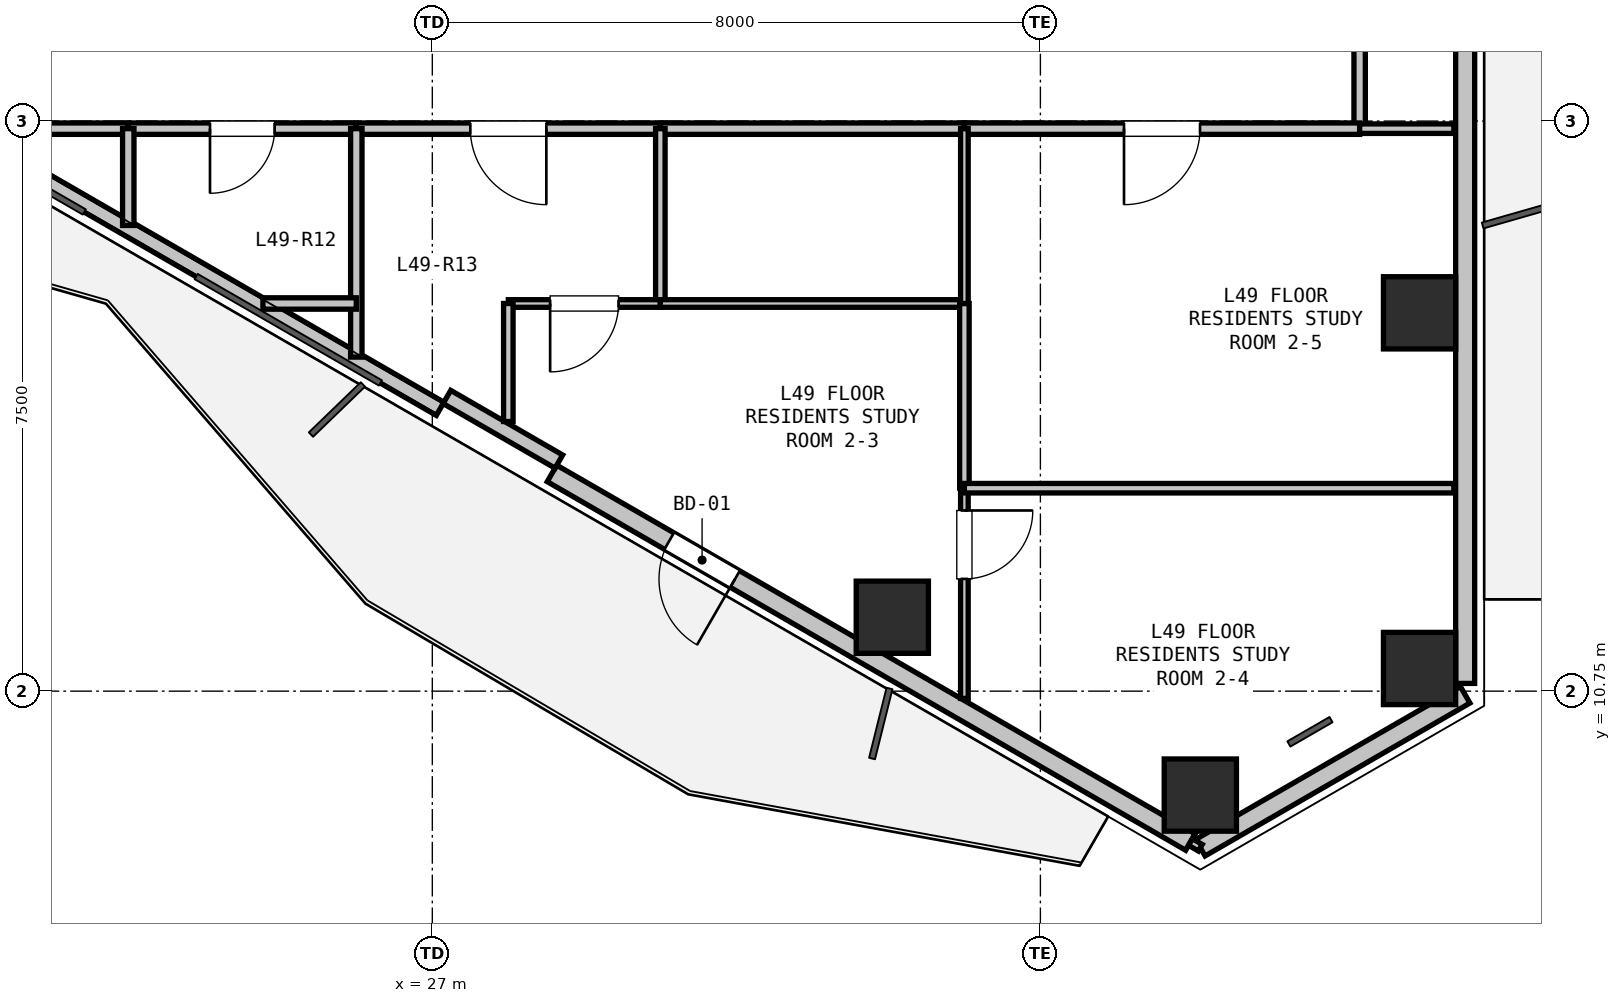
"""IFC4 building model, lengths in metres.
Left out: names, types, materials, properties, quantities, classifications, styles, units other than length and angle.
Written with IfcOpenShell. Run it as: python <this file> out.ifc"""

import sys

from ifc_helpers import new_model, si_unit, direction, frame, frame_2d, origin, origin_2d, place, context, subcontext, project, spatial, rectangle, hollow_rectangle, extrude, element, fill, save


model = new_model("IFC4")
c1 = context("Model", 3, precision=1e-05, world=origin(), true_north=direction((0.0, 1.0)))
c2 = subcontext(c1, "Body", "Model", "MODEL_VIEW")
j1 = project(units=[si_unit("LENGTHUNIT", "METRE"), si_unit("PLANEANGLEUNIT", "RADIAN")], contexts=[c1])
p1 = place(None, origin())
s1 = spatial("IfcSite", under=j1, at=p1, CompositionType="ELEMENT")
p2 = place(p1, origin())
s2 = spatial("IfcBuilding", under=s1, at=p2, CompositionType="ELEMENT")
p3 = place(p2, frame((0.0, 0.0, 178.8)))
s3 = spatial("IfcBuildingStorey", under=s2, at=p3, CompositionType="ELEMENT", Elevation=178.8)
for number, where, z_axis, x_axis in (
    (1, (39.988, 15.727, 0.0), (0.0, 0.0, 1.0), (1.0, 0.0, 0.0)),
    (2, (39.988, 11.048, 0.0), (0.0, 0.0, 1.0), (1.0, 0.0, 0.0)),
    (3, (37.104, 9.383, 0.0), (0.0, 0.0, 1.0), (1.0, 0.0, 0.0)),
    (4, (33.052, 11.722, 0.0), (0.0, 0.0, 1.0), (1.0, 0.0, 0.0)),
):
    element("IfcColumn", number, at=place(p3, frame(where, z_axis=z_axis, x_axis=x_axis)), inside=s3, PredefinedType="COLUMN", context=c2, shape_type="SweptSolid", body=[
        extrude(hollow_rectangle(XDim=0.95, YDim=0.95, WallThickness=0.028, at=origin_2d()), origin(), (0.0, 0.0, 1.0), 3.3),
    ])
p4 = place(p3, frame((40.588, 10.702, 0.0), z_axis=(0.0, 0.0, 1.0), x_axis=(-0.866023907196, -0.500002592159, 0.0)))
e5 = element("IfcWall", 5, at=p4, inside=s3, PredefinedType="SOLIDWALL", context=c2, shape_type="SweptSolid", body=[
    extrude(rectangle(XDim=4.023, YDim=0.25, at=frame_2d((2.012, 0.0))), origin(), (0.0, 0.0, 1.0), 2.69),
])
p5 = place(p3, frame((40.588, 20.551, 0.0), z_axis=(0.0, 0.0, 1.0), x_axis=(0.0, -1.0, 0.0)))
e6 = element("IfcWall", 6, at=p5, inside=s3, PredefinedType="SOLIDWALL", context=c2, shape_type="SweptSolid", body=[
    extrude(rectangle(XDim=9.699, YDim=0.25, at=frame_2d((4.85, 0.0))), origin(), (0.0, 0.0, 1.0), 2.69),
])
p6 = place(p3, frame((36.974, 8.765, 0.0), z_axis=(0.0, 0.0, 1.0), x_axis=(-0.866016233231, 0.500015883528, 0.0)))
e7 = element("IfcWall", 7, at=p6, inside=s3, PredefinedType="SOLIDWALL", context=c2, shape_type="SweptSolid", body=[
    extrude(rectangle(XDim=9.699, YDim=0.25, at=frame_2d((4.85, 0.0))), origin(), (0.0, 0.0, 1.0), 2.69),
])
p7 = place(p6, frame((6.919, 0.0, 0.0)))
e8 = element("IfcOpeningElement", 8, at=p7, cuts=e7, PredefinedType="OPENING", context=c2, shape_type="SweptSolid", body=[
    extrude(rectangle(XDim=1.0, YDim=2.1, at=frame_2d((0.5, 1.05))), frame((0.0, 0.135, 0.0), z_axis=(0.0, -1.0, 0.0), x_axis=(1.0, 0.0, 0.0)), (0.0, 0.0, 1.0), 0.27),
])
p8 = place(p3, frame((27.102, 14.464, 0.0), z_axis=(0.0, 0.0, 1.0), x_axis=(-0.866020680503, 0.500008180874, 0.0)))
e9 = element("IfcWall", 9, at=p8, inside=s3, PredefinedType="PARAPET", context=c2, shape_type="SweptSolid", body=[
    extrude(rectangle(XDim=8.999, YDim=0.2, at=frame_2d((4.5, 0.0))), origin(), (0.0, 0.0, 1.0), 0.2),
])
p9 = place(p3, frame((28.665, 13.77, 0.0), z_axis=(0.0, 0.0, 1.0), x_axis=(-0.866025371046, 0.500000056704, 0.0)))
e10 = element("IfcWall", 10, at=p9, inside=s3, PredefinedType="PARAPET", context=c2, shape_type="SweptSolid", body=[
    extrude(rectangle(XDim=1.7, YDim=0.2, at=frame_2d((0.85, 0.0))), origin(), (0.0, 0.0, 1.0), 2.69),
])
p10 = place(p3, frame((39.2, 19.9, 0.0), z_axis=(0.0, 0.0, 1.0), x_axis=(0.0, -1.0, 0.0)))
e11 = element("IfcWall", 11, at=p10, inside=s3, PredefinedType="PARTITIONING", context=c2, shape_type="SweptSolid", body=[
    extrude(rectangle(XDim=1.75, YDim=0.15, at=frame_2d((0.875, 0.0))), origin(), (0.0, 0.0, 1.0), 3.07),
])
p11 = place(p3, frame((39.2, 18.15, 0.0), z_axis=(0.0, 0.0, 1.0), x_axis=(-1.0, 0.0, 0.0)))
e12 = element("IfcWall", 12, at=p11, inside=s3, PredefinedType="PARTITIONING", context=c2, shape_type="SweptSolid", body=[
    extrude(rectangle(XDim=5.2, YDim=0.15, at=frame_2d((2.6, 0.0))), origin(), (0.0, 0.0, 1.0), 2.518),
])
p12 = place(p11, frame((2.1, 0.0, 0.0)))
e13 = element("IfcOpeningElement", 13, at=p12, cuts=e12, PredefinedType="OPENING", context=c2, shape_type="SweptSolid", body=[
    extrude(rectangle(XDim=1.0, YDim=2.15, at=frame_2d((0.5, 1.075))), frame((0.0, 0.085, 0.0), z_axis=(0.0, -1.0, 0.0), x_axis=(1.0, 0.0, 0.0)), (0.0, 0.0, 1.0), 0.17),
])
p13 = place(p3, frame((34.0, 18.15, 0.0), z_axis=(0.0, 0.0, 1.0), x_axis=(-1.0, 0.0, 0.0)))
e14 = element("IfcWall", 14, at=p13, inside=s3, PredefinedType="PARTITIONING", context=c2, shape_type="SweptSolid", body=[
    extrude(rectangle(XDim=4.0, YDim=0.15, at=frame_2d((2.0, 0.0))), origin(), (0.0, 0.0, 1.0), 3.07),
])
p14 = place(p3, frame((30.0, 18.15, 0.0), z_axis=(0.0, 0.0, 1.0), x_axis=(-1.0, 0.0, 0.0)))
e15 = element("IfcWall", 15, at=p14, inside=s3, PredefinedType="PARTITIONING", context=c2, shape_type="SweptSolid", body=[
    extrude(rectangle(XDim=4.0, YDim=0.15, at=frame_2d((2.0, 0.0))), origin(), (0.0, 0.0, 1.0), 3.07),
])
p15 = place(p14, frame((1.5, 0.0, 0.0)))
e16 = element("IfcOpeningElement", 16, at=p15, cuts=e15, PredefinedType="OPENING", context=c2, shape_type="SweptSolid", body=[
    extrude(rectangle(XDim=1.0, YDim=2.15, at=frame_2d((0.5, 1.075))), frame((0.0, 0.085, 0.0), z_axis=(0.0, -1.0, 0.0), x_axis=(1.0, 0.0, 0.0)), (0.0, 0.0, 1.0), 0.17),
])
p16 = place(p3, frame((26.0, 18.15, 0.0), z_axis=(0.0, 0.0, 1.0), x_axis=(-1.0, 0.0, 0.0)))
e17 = element("IfcWall", 17, at=p16, inside=s3, PredefinedType="PARTITIONING", context=c2, shape_type="SweptSolid", body=[
    extrude(rectangle(XDim=3.0, YDim=0.15, at=frame_2d((1.5, 0.0))), origin(), (0.0, 0.0, 1.0), 2.518),
])
p17 = place(p16, frame((1.075, 0.0, 0.0)))
e18 = element("IfcOpeningElement", 18, at=p17, cuts=e17, PredefinedType="OPENING", context=c2, shape_type="SweptSolid", body=[
    extrude(rectangle(XDim=0.85, YDim=2.1, at=frame_2d((0.425, 1.05))), frame((0.0, 0.085, 0.0), z_axis=(0.0, -1.0, 0.0), x_axis=(1.0, 0.0, 0.0)), (0.0, 0.0, 1.0), 0.17),
])
p18 = place(p3, frame((23.0, 18.15, 0.0), z_axis=(0.0, 0.0, 1.0), x_axis=(-1.0, 0.0, 0.0)))
e19 = element("IfcWall", 19, at=p18, inside=s3, PredefinedType="PARTITIONING", context=c2, shape_type="SweptSolid", body=[
    extrude(rectangle(XDim=2.212, YDim=0.15, at=frame_2d((1.106, 0.0))), origin(), (0.0, 0.0, 1.0), 2.365),
])
p19 = place(p3, frame((26.0, 18.15, 0.0), z_axis=(0.0, 0.0, 1.0), x_axis=(0.0, -1.0, 0.0)))
e20 = element("IfcWall", 20, at=p19, inside=s3, PredefinedType="PARTITIONING", context=c2, shape_type="SweptSolid", body=[
    extrude(rectangle(XDim=3.005, YDim=0.15, at=frame_2d((1.502, 0.0))), origin(), (0.0, 0.0, 1.0), 2.365),
])
p20 = place(p3, frame((26.0, 15.85, 0.0), z_axis=(0.0, 0.0, 1.0), x_axis=(-1.0, 0.0, 0.0)))
e21 = element("IfcWall", 21, at=p20, inside=s3, PredefinedType="PARTITIONING", context=c2, shape_type="SweptSolid", body=[
    extrude(rectangle(XDim=1.229, YDim=0.15, at=frame_2d((0.614, 0.0))), origin(), (0.0, 0.0, 1.0), 2.365),
])
p21 = place(p3, frame((23.0, 16.877, 0.0), z_axis=(0.0, 0.0, 1.0), x_axis=(0.0, 1.0, 0.0)))
e22 = element("IfcWall", 22, at=p21, inside=s3, PredefinedType="PARTITIONING", context=c2, shape_type="SweptSolid", body=[
    extrude(rectangle(XDim=1.273, YDim=0.15, at=frame_2d((0.636, 0.0))), origin(), (0.0, 0.0, 1.0), 2.365),
])
p22 = place(p3, frame((30.0, 18.15, 0.0), z_axis=(0.0, 0.0, 1.0), x_axis=(0.0, -1.0, 0.0)))
e23 = element("IfcWall", 23, at=p22, inside=s3, PredefinedType="PARTITIONING", context=c2, shape_type="SweptSolid", body=[
    extrude(rectangle(XDim=2.3, YDim=0.125, at=frame_2d((1.15, 0.0))), origin(), (0.0, 0.0, 1.0), 3.07),
])
p23 = place(p3, frame((30.0, 15.85, 0.0), z_axis=(0.0, 0.0, 1.0), x_axis=(-1.0, 0.0, 0.0)))
e24 = element("IfcWall", 24, at=p23, inside=s3, PredefinedType="PARTITIONING", context=c2, shape_type="SweptSolid", body=[
    extrude(rectangle(XDim=2.0, YDim=0.1, at=frame_2d((1.0, 0.0))), origin(), (0.0, 0.0, 1.0), 3.07),
])
p24 = place(p23, frame((0.55, 0.0, 0.0)))
e25 = element("IfcOpeningElement", 25, at=p24, cuts=e24, PredefinedType="OPENING", context=c2, shape_type="SweptSolid", body=[
    extrude(rectangle(XDim=0.9, YDim=2.1, at=frame_2d((0.45, 1.05))), frame((0.0, 0.06, 0.0), z_axis=(0.0, -1.0, 0.0), x_axis=(1.0, 0.0, 0.0)), (0.0, 0.0, 1.0), 0.12),
])
p25 = place(p3, frame((28.0, 15.85, 0.0), z_axis=(0.0, 0.0, 1.0), x_axis=(0.0, -1.0, 0.0)))
e26 = element("IfcWall", 26, at=p25, inside=s3, PredefinedType="PARTITIONING", context=c2, shape_type="SweptSolid", body=[
    extrude(rectangle(XDim=1.553, YDim=0.125, at=frame_2d((0.776, 0.0))), origin(), (0.0, 0.0, 1.0), 2.365),
])
p26 = place(p3, frame((30.0, 15.85, 0.0), z_axis=(0.0, 0.0, 1.0), x_axis=(1.0, 0.0, 0.0)))
e27 = element("IfcWall", 27, at=p26, inside=s3, PredefinedType="PARTITIONING", context=c2, shape_type="SweptSolid", body=[
    extrude(rectangle(XDim=4.0, YDim=0.1, at=frame_2d((2.0, 0.0))), origin(), (0.0, 0.0, 1.0), 3.07),
])
p27 = place(p3, frame((34.0, 15.85, 0.0), z_axis=(0.0, 0.0, 1.0), x_axis=(0.0, -1.0, 0.0)))
e28 = element("IfcWall", 28, at=p27, inside=s3, PredefinedType="PARTITIONING", context=c2, shape_type="SweptSolid", body=[
    extrude(rectangle(XDim=2.43, YDim=0.125, at=frame_2d((1.215, 0.0))), origin(), (0.0, 0.0, 1.0), 3.07),
])
p28 = place(p3, frame((34.0, 13.42, 0.0), z_axis=(0.0, 0.0, 1.0), x_axis=(0.0, -1.0, 0.0)))
e29 = element("IfcWall", 29, at=p28, inside=s3, PredefinedType="PARTITIONING", context=c2, shape_type="SweptSolid", body=[
    extrude(rectangle(XDim=2.766, YDim=0.1, at=frame_2d((1.383, 0.0))), origin(), (0.0, 0.0, 1.0), 2.734),
])
p29 = place(p28, frame((0.293, 0.0, 0.0)))
e30 = element("IfcOpeningElement", 30, at=p29, cuts=e29, PredefinedType="OPENING", context=c2, shape_type="SweptSolid", body=[
    extrude(rectangle(XDim=0.9, YDim=2.1, at=frame_2d((0.45, 1.05))), frame((0.0, 0.06, 0.0), z_axis=(0.0, -1.0, 0.0), x_axis=(1.0, 0.0, 0.0)), (0.0, 0.0, 1.0), 0.12),
])
p30 = place(p3, frame((34.0, 13.42, 0.0), z_axis=(0.0, 0.0, 1.0), x_axis=(1.0, 0.0, 0.0)))
e31 = element("IfcWall", 31, at=p30, inside=s3, PredefinedType="PARTITIONING", context=c2, shape_type="SweptSolid", body=[
    extrude(rectangle(XDim=6.439, YDim=0.125, at=frame_2d((3.22, 0.0))), origin(), (0.0, 0.0, 1.0), 2.518),
])
p31 = place(p3, frame((37.104, 8.69, 0.0), z_axis=(0.0, 0.0, 1.0), x_axis=(-0.866131372301, 0.499816412211, 0.0)))
e32 = element("IfcWall", 32, at=p31, inside=s3, PredefinedType="PARTITIONING", context=c2, shape_type="SweptSolid", body=[
    extrude(rectangle(XDim=0.15, YDim=0.1, at=frame_2d((0.075, 0.0))), origin(), (0.0, 0.0, 1.0), 3.07),
])
p32 = place(p3, frame((39.2, 18.15, 0.0), z_axis=(0.0, 0.0, 1.0), x_axis=(1.0, 0.0, 0.0)))
e33 = element("IfcWall", 33, at=p32, inside=s3, PredefinedType="PARTITIONING", context=c2, shape_type="SweptSolid", body=[
    extrude(rectangle(XDim=1.24, YDim=0.125, at=frame_2d((0.62, 0.0))), origin(), (0.0, 0.0, 1.0), 2.365),
])
p33 = place(p3, frame((34.0, 15.85, 0.0), z_axis=(0.0, 0.0, 1.0), x_axis=(0.0, 1.0, 0.0)))
e34 = element("IfcWall", 34, at=p33, inside=s3, PredefinedType="PARTITIONING", context=c2, shape_type="SweptSolid", body=[
    extrude(rectangle(XDim=2.3, YDim=0.1, at=frame_2d((1.15, 0.0))), origin(), (0.0, 0.0, 1.0), 3.07),
])
p34 = place(p7, origin())
e35 = element("IfcDoor", 35, at=p34, inside=s3, OperationType="SINGLE_SWING_LEFT", PredefinedType="DOOR", context=c2, shape_type="SweptSolid", body=[
    extrude(rectangle(XDim=1.0, YDim=2.1, at=frame_2d((0.5, 1.05))), frame((0.0, 0.025, 0.0), z_axis=(0.0, -1.0, 0.0), x_axis=(1.0, 0.0, 0.0)), (0.0, 0.0, 1.0), 0.05),
])
fill(e8, e35)
p35 = place(p17, origin())
e36 = element("IfcDoor", 36, at=p35, inside=s3, OperationType="SINGLE_SWING_RIGHT", PredefinedType="DOOR", context=c2, shape_type="SweptSolid", body=[
    extrude(rectangle(XDim=0.85, YDim=2.1, at=frame_2d((0.425, 1.05))), frame((0.0, 0.025, 0.0), z_axis=(0.0, -1.0, 0.0), x_axis=(1.0, 0.0, 0.0)), (0.0, 0.0, 1.0), 0.05),
])
fill(e18, e36)
p36 = place(p15, origin())
e37 = element("IfcDoor", 37, at=p36, inside=s3, OperationType="SINGLE_SWING_LEFT", PredefinedType="DOOR", context=c2, shape_type="SweptSolid", body=[
    extrude(rectangle(XDim=1.0, YDim=2.15, at=frame_2d((0.5, 1.075))), frame((0.0, 0.025, 0.0), z_axis=(0.0, -1.0, 0.0), x_axis=(1.0, 0.0, 0.0)), (0.0, 0.0, 1.0), 0.05),
])
fill(e16, e37)
p37 = place(p12, origin())
e38 = element("IfcDoor", 38, at=p37, inside=s3, OperationType="SINGLE_SWING_RIGHT", PredefinedType="DOOR", context=c2, shape_type="SweptSolid", body=[
    extrude(rectangle(XDim=1.0, YDim=2.15, at=frame_2d((0.5, 1.075))), frame((0.0, 0.025, 0.0), z_axis=(0.0, -1.0, 0.0), x_axis=(1.0, 0.0, 0.0)), (0.0, 0.0, 1.0), 0.05),
])
fill(e13, e38)
p38 = place(p24, origin())
e39 = element("IfcDoor", 39, at=p38, inside=s3, OperationType="SINGLE_SWING_RIGHT", PredefinedType="DOOR", context=c2, shape_type="SweptSolid", body=[
    extrude(rectangle(XDim=0.9, YDim=2.1, at=frame_2d((0.45, 1.05))), frame((0.0, 0.025, 0.0), z_axis=(0.0, -1.0, 0.0), x_axis=(1.0, 0.0, 0.0)), (0.0, 0.0, 1.0), 0.05),
])
fill(e25, e39)
p39 = place(p29, origin())
e40 = element("IfcDoor", 40, at=p39, inside=s3, OperationType="SINGLE_SWING_LEFT", PredefinedType="DOOR", context=c2, shape_type="SweptSolid", body=[
    extrude(rectangle(XDim=0.9, YDim=2.1, at=frame_2d((0.45, 1.05))), frame((0.0, 0.025, 0.0), z_axis=(0.0, -1.0, 0.0), x_axis=(1.0, 0.0, 0.0)), (0.0, 0.0, 1.0), 0.05),
])
fill(e30, e40)
save(model, sys.argv[1])
